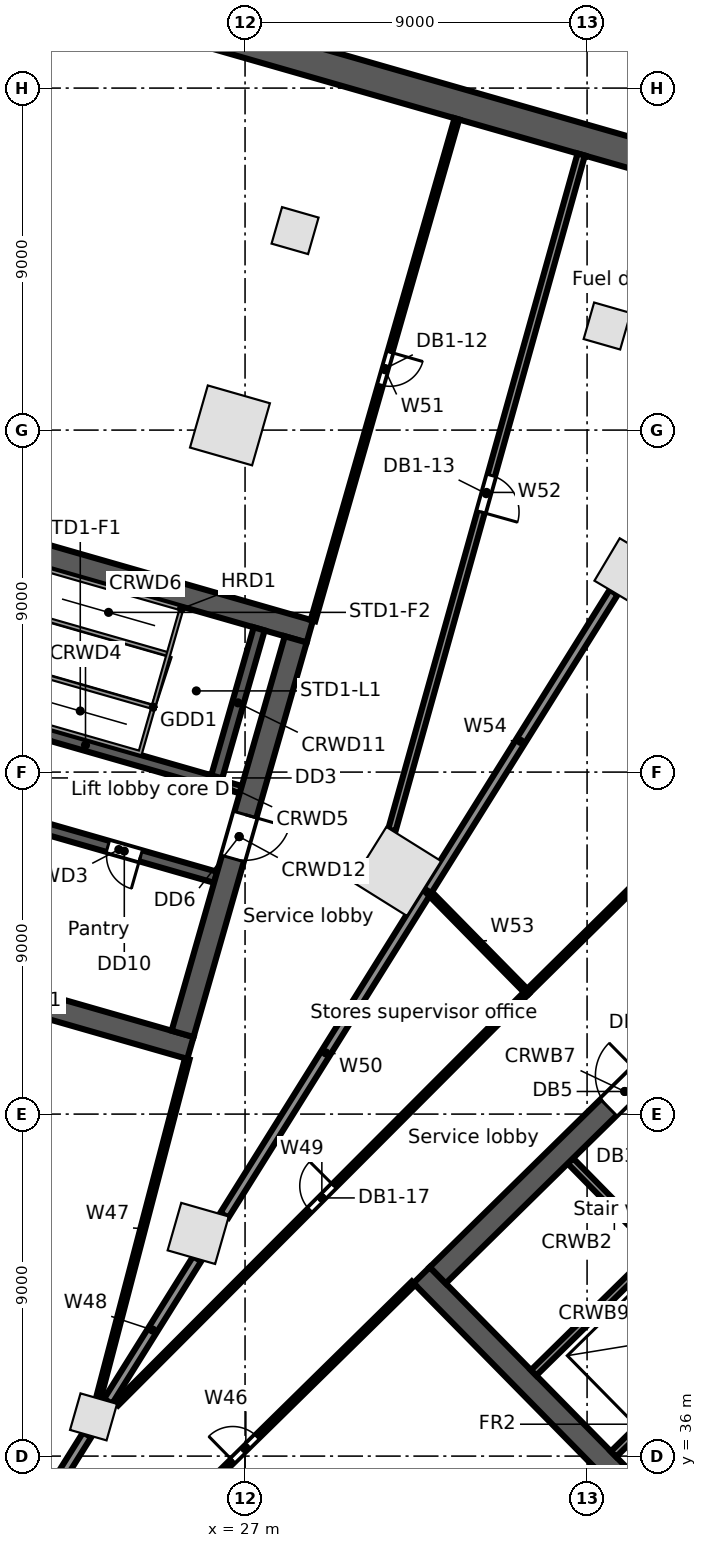
"""IFC4 building model, lengths in metres.
Left out: names, types, materials, properties, quantities, classifications, styles, units other than length and angle.
Written with IfcOpenShell. Run it as: python <this file> out.ifc"""

import sys

from ifc_helpers import new_model, si_unit, direction, frame, frame_2d, origin, origin_2d, place, context, subcontext, project, spatial, rectangle, extrude, element, fill, save


model = new_model("IFC4")
c1 = context("Model", 3, precision=1e-05, world=origin(), true_north=direction((0.0, 1.0)))
c2 = subcontext(c1, "Body", "Model", "MODEL_VIEW")
j1 = project(units=[si_unit("LENGTHUNIT", "METRE"), si_unit("PLANEANGLEUNIT", "RADIAN")], contexts=[c1])
p1 = place(None, origin())
s1 = spatial("IfcSite", under=j1, at=p1, CompositionType="ELEMENT")
p2 = place(p1, origin())
s2 = spatial("IfcBuilding", under=s1, at=p2, CompositionType="ELEMENT")
p3 = place(p2, frame((0.0, 0.0, -4.8)))
s3 = spatial("IfcBuildingStorey", under=s2, at=p3, CompositionType="ELEMENT", Elevation=-4.8)
p4 = place(p3, frame((38.062, 70.032, 0.0), z_axis=(0.0, 0.0, 1.0), x_axis=(-0.961260654426, 0.275640987977, 0.0)))
e1 = element("IfcWall", 1, at=p4, inside=s3, PredefinedType="SOLIDWALL", context=c2, shape_type="SweptSolid", body=[
    extrude(rectangle(XDim=35.435, YDim=0.8, at=frame_2d((17.718, 0.0))), origin(), (0.0, 0.0, 1.0), 4.8),
])
p5 = place(p3, frame((37.085, 59.262, 0.0), z_axis=(0.0, 0.0, 1.0), x_axis=(-0.859406411501, 0.511293086077, 0.0)))
e2 = element("IfcColumn", 2, at=p5, inside=s3, PredefinedType="COLUMN", context=c2, shape_type="SweptSolid", body=[
    extrude(rectangle(XDim=1.3, YDim=1.3, at=origin_2d()), origin(), (0.0, 0.0, 1.0), 4.8),
])
p6 = place(p3, frame((26.603, 63.124, 0.0), z_axis=(0.0, 0.0, 1.0), x_axis=(-0.961261695938, 0.275637355817, 0.0)))
e3 = element("IfcColumn", 3, at=p6, inside=s3, PredefinedType="COLUMN", context=c2, shape_type="SweptSolid", body=[
    extrude(rectangle(XDim=1.7, YDim=1.7, at=origin_2d()), origin(), (0.0, 0.0, 1.0), 4.8),
])
p7 = place(p3, frame((25.767, 41.86, 0.0), z_axis=(0.0, 0.0, 1.0), x_axis=(0.961261695938, -0.275637355817, 0.0)))
e4 = element("IfcColumn", 4, at=p7, inside=s3, PredefinedType="COLUMN", context=c2, shape_type="SweptSolid", body=[
    extrude(rectangle(XDim=1.3, YDim=1.3, at=origin_2d()), origin(), (0.0, 0.0, 1.0), 4.8),
])
p8 = place(p3, frame((30.99, 51.386, 0.0), z_axis=(0.0, 0.0, 1.0), x_axis=(0.529919264233, 0.848048096156, 0.0)))
e5 = element("IfcColumn", 5, at=p8, inside=s3, PredefinedType="COLUMN", context=c2, shape_type="SweptSolid", body=[
    extrude(rectangle(XDim=1.7, YDim=1.7, at=origin_2d()), origin(), (0.0, 0.0, 1.0), 4.8),
])
for number, where, z_axis, x_axis in (
    (6, (36.528, 65.739, 0.0), (0.0, 0.0, 1.0), (-0.961, 0.276, 0.0)),
    (7, (28.316, 68.25, 0.0), (0.0, 0.0, 1.0), (-0.961, 0.276, 0.0)),
    (8, (23.013, 37.032, 0.0), (0.0, 0.0, 1.0), (0.961, -0.276, 0.0)),
):
    element("IfcColumn", number, at=place(p3, frame(where, z_axis=z_axis, x_axis=x_axis)), inside=s3, PredefinedType="COLUMN", context=c2, shape_type="SweptSolid", body=[
        extrude(rectangle(XDim=1.0, YDim=1.0, at=origin_2d()), origin(), (0.0, 0.0, 1.0), 4.8),
    ])
p9 = place(p3, frame((31.646, 40.763, 0.0), z_axis=(0.0, 0.0, 1.0), x_axis=(0.700911255944, -0.713248491965, 0.0)))
e9 = element("IfcWall", 9, at=p9, inside=s3, PredefinedType="SOLIDWALL", context=c2, shape_type="SweptSolid", body=[
    extrude(rectangle(XDim=15.0, YDim=0.6, at=frame_2d((7.5, 0.0))), origin(), (0.0, 0.0, 1.0), 4.35),
])
p10 = place(p9, frame((12.9, 0.0, 0.0)))
e10 = element("IfcOpeningElement", 10, at=p10, cuts=e9, PredefinedType="OPENING", context=c2, shape_type="SweptSolid", body=[
    extrude(rectangle(XDim=1.2, YDim=2.1, at=frame_2d((0.6, 1.05))), frame((0.0, 0.31, 0.0), z_axis=(0.0, -1.0, 0.0), x_axis=(1.0, 0.0, 0.0)), (0.0, 0.0, 1.0), 0.62),
])
p11 = place(p3, frame((35.561, 43.769, 0.0), z_axis=(0.0, 0.0, 1.0), x_axis=(0.70090232736, -0.713257266, 0.0)))
e11 = element("IfcWall", 11, at=p11, inside=s3, PredefinedType="SOLIDWALL", context=c2, shape_type="SweptSolid", body=[
    extrude(rectangle(XDim=3.3, YDim=0.2, at=frame_2d((1.65, 0.0))), origin(), (0.0, 0.0, 1.0), 4.35),
])
p12 = place(p3, frame((32.07, 40.759, 0.0), z_axis=(0.0, 0.0, 1.0), x_axis=(0.713245344712, 0.70091445858, 0.0)))
e12 = element("IfcWall", 12, at=p12, inside=s3, PredefinedType="SOLIDWALL", context=c2, shape_type="SweptSolid", body=[
    extrude(rectangle(XDim=13.8, YDim=0.6, at=frame_2d((6.9, 0.0))), origin(), (0.0, 0.0, 1.0), 4.35),
])
p13 = place(p12, frame((6.3, 0.0, 0.0)))
e13 = element("IfcOpeningElement", 13, at=p13, cuts=e12, PredefinedType="OPENING", context=c2, shape_type="SweptSolid", body=[
    extrude(rectangle(XDim=1.2, YDim=2.1, at=frame_2d((0.6, 1.05))), frame((0.0, 0.31, 0.0), z_axis=(0.0, -1.0, 0.0), x_axis=(1.0, 0.0, 0.0)), (0.0, 0.0, 1.0), 0.62),
])
p14 = place(p3, frame((37.104, 42.342, 0.0), z_axis=(0.0, 0.0, 1.0), x_axis=(0.713281298468, 0.700877870428, 0.0)))
e14 = element("IfcWall", 14, at=p14, inside=s3, PredefinedType="PARTITIONING", context=c2, shape_type="SweptSolid", body=[
    extrude(rectangle(XDim=4.35, YDim=0.2, at=frame_2d((2.175, 0.0))), origin(), (0.0, 0.0, 1.0), 4.35),
])
p15 = place(p14, frame((1.7, 0.0, 0.0)))
e15 = element("IfcOpeningElement", 15, at=p15, cuts=e14, PredefinedType="OPENING", context=c2, shape_type="SweptSolid", body=[
    extrude(rectangle(XDim=1.0, YDim=2.1, at=frame_2d((0.5, 1.05))), frame((0.0, 0.11, 0.0), z_axis=(0.0, -1.0, 0.0), x_axis=(1.0, 0.0, 0.0)), (0.0, 0.0, 1.0), 0.22),
])
p16 = place(p3, frame((34.593, 38.191, 0.0), z_axis=(0.0, 0.0, 1.0), x_axis=(0.713252216116, 0.700907466222, 0.0)))
e16 = element("IfcWall", 16, at=p16, inside=s3, PredefinedType="SOLIDWALL", context=c2, shape_type="SweptSolid", body=[
    extrude(rectangle(XDim=4.45, YDim=0.2, at=frame_2d((2.225, 0.0))), origin(), (0.0, 0.0, 1.0), 4.35),
])
p17 = place(p3, frame((36.696, 36.052, 0.0), z_axis=(0.0, 0.0, 1.0), x_axis=(0.713251741427, 0.700907949271, 0.0)))
e17 = element("IfcWall", 17, at=p17, inside=s3, PredefinedType="SOLIDWALL", context=c2, shape_type="SweptSolid", body=[
    extrude(rectangle(XDim=4.45, YDim=0.2, at=frame_2d((2.225, 0.0))), origin(), (0.0, 0.0, 1.0), 4.35),
])
p18 = place(p3, frame((16.911, 49.221, 0.0), z_axis=(0.0, 0.0, 1.0), x_axis=(0.96126248289, -0.275634611374, 0.0)))
e18 = element("IfcWall", 18, at=p18, inside=s3, PredefinedType="SOLIDWALL", context=c2, shape_type="SweptSolid", body=[
    extrude(rectangle(XDim=9.0, YDim=0.6, at=frame_2d((4.5, 0.0))), origin(), (0.0, 0.0, 1.0), 4.35),
])
p19 = place(p3, frame((21.131, 52.692, 0.0), z_axis=(0.0, 0.0, 1.0), x_axis=(0.961271492568, -0.275603188616, 0.0)))
e19 = element("IfcWall", 19, at=p19, inside=s3, PredefinedType="SOLIDWALL", context=c2, shape_type="SweptSolid", body=[
    extrude(rectangle(XDim=5.3, YDim=0.3, at=frame_2d((2.65, 0.0))), origin(), (0.0, 0.0, 1.0), 4.35),
])
p20 = place(p19, frame((2.35, 0.0, 0.0)))
e20 = element("IfcOpeningElement", 20, at=p20, cuts=e19, PredefinedType="OPENING", context=c2, shape_type="SweptSolid", body=[
    extrude(rectangle(XDim=0.9, YDim=2.1, at=frame_2d((0.45, 1.05))), frame((0.0, 0.16, 0.0), z_axis=(0.0, -1.0, 0.0), x_axis=(1.0, 0.0, 0.0)), (0.0, 0.0, 1.0), 0.32),
])
p21 = place(p3, frame((19.389, 55.689, 0.0), z_axis=(0.0, 0.0, 1.0), x_axis=(0.961261397636, -0.275638396117, 0.0)))
e21 = element("IfcWall", 21, at=p21, inside=s3, PredefinedType="SOLIDWALL", context=c2, shape_type="SweptSolid", body=[
    extrude(rectangle(XDim=7.1, YDim=0.3, at=frame_2d((3.55, 0.0))), origin(), (0.0, 0.0, 1.0), 4.35),
])
p22 = place(p21, frame((0.2, 0.0, 0.0)))
e22 = element("IfcOpeningElement", 22, at=p22, cuts=e21, PredefinedType="OPENING", context=c2, shape_type="SweptSolid", body=[
    extrude(rectangle(XDim=1.0, YDim=2.1, at=frame_2d((0.5, 1.05))), frame((0.0, 0.16, 0.0), z_axis=(0.0, -1.0, 0.0), x_axis=(1.0, 0.0, 0.0)), (0.0, 0.0, 1.0), 0.32),
])
p23 = place(p3, frame((26.214, 53.732, 0.0), z_axis=(0.0, 0.0, 1.0), x_axis=(0.96122076476, -0.27578005982, 0.0)))
e23 = element("IfcWall", 23, at=p23, inside=s3, PredefinedType="SOLIDWALL", context=c2, shape_type="SweptSolid", body=[
    extrude(rectangle(XDim=0.7, YDim=0.2, at=frame_2d((0.35, 0.0))), origin(), (0.0, 0.0, 1.0), 4.35),
])
p24 = place(p3, frame((20.053, 60.18, 0.0), z_axis=(0.0, 0.0, 1.0), x_axis=(0.96126248289, -0.275634611374, 0.0)))
e24 = element("IfcWall", 24, at=p24, inside=s3, PredefinedType="SOLIDWALL", context=c2, shape_type="SweptSolid", body=[
    extrude(rectangle(XDim=9.0, YDim=0.6, at=frame_2d((4.5, 0.0))), origin(), (0.0, 0.0, 1.0), 4.35),
])
p25 = place(p3, frame((26.256, 53.876, 0.0), z_axis=(0.0, 0.0, 1.0), x_axis=(0.275612739511, 0.961268754209, 0.0)))
e25 = element("IfcWall", 25, at=p25, inside=s3, PredefinedType="SOLIDWALL", context=c2, shape_type="SweptSolid", body=[
    extrude(rectangle(XDim=4.05, YDim=0.3, at=frame_2d((2.025, 0.0))), origin(), (0.0, 0.0, 1.0), 4.35),
])
p26 = place(p3, frame((25.356, 47.112, 0.0), z_axis=(0.0, 0.0, 1.0), x_axis=(0.275631631629, 0.961263337304, 0.0)))
e26 = element("IfcWall", 26, at=p26, inside=s3, PredefinedType="SOLIDWALL", context=c2, shape_type="SweptSolid", body=[
    extrude(rectangle(XDim=10.8, YDim=0.6, at=frame_2d((5.4, 0.0))), origin(), (0.0, 0.0, 1.0), 4.35),
])
p27 = place(p26, frame((4.8, 0.0, 0.0)))
e27 = element("IfcOpeningElement", 27, at=p27, cuts=e26, PredefinedType="OPENING", context=c2, shape_type="SweptSolid", body=[
    extrude(rectangle(XDim=1.2, YDim=2.1, at=frame_2d((0.6, 1.05))), frame((0.0, 0.31, 0.0), z_axis=(0.0, -1.0, 0.0), x_axis=(1.0, 0.0, 0.0)), (0.0, 0.0, 1.0), 0.62),
])
p28 = place(p3, frame((20.916, 33.472, 0.0), z_axis=(0.0, 0.0, 1.0), x_axis=(0.529775918086, 0.848137651927, 0.0)))
e28 = element("IfcWall", 28, at=p28, inside=s3, PredefinedType="PARTITIONING", context=c2, shape_type="SweptSolid", body=[
    extrude(rectangle(XDim=3.641, YDim=0.25, at=frame_2d((1.821, 0.0))), origin(), (0.0, 0.0, 1.0), 4.35),
])
p29 = place(p3, frame((22.61, 31.884, 0.0), z_axis=(0.0, 0.0, 1.0), x_axis=(0.71329764845, 0.700861230712, 0.0)))
e29 = element("IfcWall", 29, at=p29, inside=s3, PredefinedType="PARTITIONING", context=c2, shape_type="SweptSolid", body=[
    extrude(rectangle(XDim=12.368, YDim=0.125, at=frame_2d((6.184, 0.0))), origin(), (0.0, 0.0, 1.0), 3.63),
])
p30 = place(p29, frame((5.7, 0.0, 0.0)))
e30 = element("IfcOpeningElement", 30, at=p30, cuts=e29, PredefinedType="OPENING", context=c2, shape_type="SweptSolid", body=[
    extrude(rectangle(XDim=0.9, YDim=2.1, at=frame_2d((0.45, 1.05))), frame((0.0, 0.073, 0.0), z_axis=(0.0, -1.0, 0.0), x_axis=(1.0, 0.0, 0.0)), (0.0, 0.0, 1.0), 0.145),
])
p31 = place(p3, frame((23.139, 37.516, 0.0), z_axis=(0.0, 0.0, 1.0), x_axis=(0.253335246865, 0.967378546741, 0.0)))
e31 = element("IfcWall", 31, at=p31, inside=s3, PredefinedType="PARTITIONING", context=c2, shape_type="SweptSolid", body=[
    extrude(rectangle(XDim=9.237, YDim=0.125, at=frame_2d((4.619, 0.0))), origin(), (0.0, 0.0, 1.0), 3.63),
])
p32 = place(p3, frame((23.396, 37.442, 0.0), z_axis=(0.0, 0.0, 1.0), x_axis=(0.529879823435, 0.848072740227, 0.0)))
e32 = element("IfcWall", 32, at=p32, inside=s3, PredefinedType="PARTITIONING", context=c2, shape_type="SweptSolid", body=[
    extrude(rectangle(XDim=4.422, YDim=0.25, at=frame_2d((2.211, 0.0))), origin(), (0.0, 0.0, 1.0), 3.412),
])
p33 = place(p3, frame((23.618, 37.379, 0.0), z_axis=(0.0, 0.0, 1.0), x_axis=(0.706356332605, 0.707856434165, 0.0)))
e33 = element("IfcWall", 33, at=p33, inside=s3, PredefinedType="PARTITIONING", context=c2, shape_type="SweptSolid", body=[
    extrude(rectangle(XDim=15.298, YDim=0.125, at=frame_2d((7.649, 0.0))), origin(), (0.0, 0.0, 1.0), 3.418),
])
p34 = place(p33, frame((7.2, 0.0, 0.0)))
e34 = element("IfcOpeningElement", 34, at=p34, cuts=e33, PredefinedType="OPENING", context=c2, shape_type="SweptSolid", body=[
    extrude(rectangle(XDim=0.9, YDim=2.1, at=frame_2d((0.45, 1.05))), frame((0.0, 0.073, 0.0), z_axis=(0.0, -1.0, 0.0), x_axis=(1.0, 0.0, 0.0)), (0.0, 0.0, 1.0), 0.145),
])
p35 = place(p3, frame((26.456, 42.338, 0.0), z_axis=(0.0, 0.0, 1.0), x_axis=(0.529866075757, 0.848081329686, 0.0)))
e35 = element("IfcWall", 35, at=p35, inside=s3, PredefinedType="PARTITIONING", context=c2, shape_type="SweptSolid", body=[
    extrude(rectangle(XDim=10.076, YDim=0.25, at=frame_2d((5.038, 0.0))), origin(), (0.0, 0.0, 1.0), 3.412),
])
p36 = place(p3, frame((28.787, 57.987, 0.0), z_axis=(0.0, 0.0, 1.0), x_axis=(0.27563893724, 0.961261242471, 0.0)))
e36 = element("IfcWall", 36, at=p36, inside=s3, PredefinedType="PARTITIONING", context=c2, shape_type="SweptSolid", body=[
    extrude(rectangle(XDim=13.735, YDim=0.125, at=frame_2d((6.867, 0.0))), origin(), (0.0, 0.0, 1.0), 3.53),
])
p37 = place(p36, frame((6.45, 0.0, 0.0)))
e37 = element("IfcOpeningElement", 37, at=p37, cuts=e36, PredefinedType="OPENING", context=c2, shape_type="SweptSolid", body=[
    extrude(rectangle(XDim=0.9, YDim=2.1, at=frame_2d((0.45, 1.05))), frame((0.0, 0.073, 0.0), z_axis=(0.0, -1.0, 0.0), x_axis=(1.0, 0.0, 0.0)), (0.0, 0.0, 1.0), 0.145),
])
p38 = place(p3, frame((30.862, 52.468, 0.0), z_axis=(0.0, 0.0, 1.0), x_axis=(0.269850069582, 0.962902352238, 0.0)))
e38 = element("IfcWall", 38, at=p38, inside=s3, PredefinedType="PARTITIONING", context=c2, shape_type="SweptSolid", body=[
    extrude(rectangle(XDim=18.469, YDim=0.2, at=frame_2d((9.234, 0.0))), origin(), (0.0, 0.0, 1.0), 3.53),
])
p39 = place(p38, frame((8.7, 0.0, 0.0)))
e39 = element("IfcOpeningElement", 39, at=p39, cuts=e38, PredefinedType="OPENING", context=c2, shape_type="SweptSolid", body=[
    extrude(rectangle(XDim=1.0, YDim=2.1, at=frame_2d((0.5, 1.05))), frame((0.0, 0.11, 0.0), z_axis=(0.0, -1.0, 0.0), x_axis=(1.0, 0.0, 0.0)), (0.0, 0.0, 1.0), 0.22),
])
p40 = place(p3, frame((31.795, 50.883, 0.0), z_axis=(0.0, 0.0, 1.0), x_axis=(0.700961783082, -0.713198835289, 0.0)))
e40 = element("IfcWall", 40, at=p40, inside=s3, PredefinedType="PARTITIONING", context=c2, shape_type="SweptSolid", body=[
    extrude(rectangle(XDim=3.751, YDim=0.125, at=frame_2d((1.875, 0.0))), origin(), (0.0, 0.0, 1.0), 3.418),
])
p41 = place(p3, frame((31.795, 50.883, 0.0), z_axis=(0.0, 0.0, 1.0), x_axis=(0.529939676421, 0.848035340864, 0.0)))
e41 = element("IfcWall", 41, at=p41, inside=s3, PredefinedType="PARTITIONING", context=c2, shape_type="SweptSolid", body=[
    extrude(rectangle(XDim=9.258, YDim=0.25, at=frame_2d((4.629, 0.0))), origin(), (0.0, 0.0, 1.0), 3.418),
])
p42 = place(p3, frame((33.916, 20.378, 0.0), z_axis=(0.0, 0.0, 1.0), x_axis=(0.857167223985, 0.515038202589, 0.0)))
e42 = element("IfcWall", 42, at=p42, inside=s3, PredefinedType="PARTITIONING", context=c2, shape_type="SweptSolid", body=[
    extrude(rectangle(XDim=39.374, YDim=0.125, at=frame_2d((19.687, 0.0))), origin(), (0.0, 0.0, 1.0), 3.418),
])
p43 = place(p3, frame((34.424, 48.208, 0.0), z_axis=(0.0, 0.0, 1.0), x_axis=(0.711998848244, 0.702180632102, 0.0)))
e43 = element("IfcWall", 43, at=p43, inside=s3, PredefinedType="PARTITIONING", context=c2, shape_type="SweptSolid", body=[
    extrude(rectangle(XDim=19.868, YDim=0.125, at=frame_2d((9.934, 0.0))), origin(), (0.0, 0.0, 1.0), 3.522),
])
p44 = place(p43, frame((9.45, 0.0, 0.0)))
e44 = element("IfcOpeningElement", 44, at=p44, cuts=e43, PredefinedType="OPENING", context=c2, shape_type="SweptSolid", body=[
    extrude(rectangle(XDim=0.9, YDim=2.1, at=frame_2d((0.45, 1.05))), frame((0.0, 0.073, 0.0), z_axis=(0.0, -1.0, 0.0), x_axis=(1.0, 0.0, 0.0)), (0.0, 0.0, 1.0), 0.145),
])
p45 = place(p13, origin())
e45 = element("IfcDoor", 45, at=p45, inside=s3, OperationType="SINGLE_SWING_RIGHT", PredefinedType="DOOR", context=c2, shape_type="SweptSolid", body=[
    extrude(rectangle(XDim=1.2, YDim=2.1, at=frame_2d((0.6, 1.05))), frame((0.0, 0.025, 0.0), z_axis=(0.0, -1.0, 0.0), x_axis=(1.0, 0.0, 0.0)), (0.0, 0.0, 1.0), 0.05),
])
fill(e13, e45)
p46 = place(p27, frame((1.2, 0.0, 0.0), z_axis=(0.0, 0.0, 1.0), x_axis=(-1.0, 0.0, 0.0)))
e46 = element("IfcDoor", 46, at=p46, inside=s3, OperationType="SINGLE_SWING_LEFT", PredefinedType="DOOR", context=c2, shape_type="SweptSolid", body=[
    extrude(rectangle(XDim=1.2, YDim=2.1, at=frame_2d((0.6, 1.05))), frame((0.0, 0.025, 0.0), z_axis=(0.0, -1.0, 0.0), x_axis=(1.0, 0.0, 0.0)), (0.0, 0.0, 1.0), 0.05),
])
fill(e27, e46)
p47 = place(p20, frame((0.9, 0.0, 0.0), z_axis=(0.0, 0.0, 1.0), x_axis=(-1.0, 0.0, 0.0)))
e47 = element("IfcDoor", 47, at=p47, inside=s3, OperationType="SINGLE_SWING_LEFT", PredefinedType="DOOR", context=c2, shape_type="SweptSolid", body=[
    extrude(rectangle(XDim=0.9, YDim=2.1, at=frame_2d((0.45, 1.05))), frame((0.0, 0.025, 0.0), z_axis=(0.0, -1.0, 0.0), x_axis=(1.0, 0.0, 0.0)), (0.0, 0.0, 1.0), 0.05),
])
fill(e20, e47)
p48 = place(p37, frame((0.9, 0.0, 0.0), z_axis=(0.0, 0.0, 1.0), x_axis=(-1.0, 0.0, 0.0)))
e48 = element("IfcDoor", 48, at=p48, inside=s3, OperationType="SINGLE_SWING_LEFT", PredefinedType="DOOR", context=c2, shape_type="SweptSolid", body=[
    extrude(rectangle(XDim=0.9, YDim=2.1, at=frame_2d((0.45, 1.05))), frame((0.0, 0.025, 0.0), z_axis=(0.0, -1.0, 0.0), x_axis=(1.0, 0.0, 0.0)), (0.0, 0.0, 1.0), 0.05),
])
fill(e37, e48)
p49 = place(p39, frame((1.0, 0.0, 0.0), z_axis=(0.0, 0.0, 1.0), x_axis=(-1.0, 0.0, 0.0)))
e49 = element("IfcDoor", 49, at=p49, inside=s3, OperationType="SINGLE_SWING_RIGHT", PredefinedType="DOOR", context=c2, shape_type="SweptSolid", body=[
    extrude(rectangle(XDim=1.0, YDim=2.1, at=frame_2d((0.5, 1.05))), frame((0.0, 0.025, 0.0), z_axis=(0.0, -1.0, 0.0), x_axis=(1.0, 0.0, 0.0)), (0.0, 0.0, 1.0), 0.05),
])
fill(e39, e49)
p50 = place(p30, origin())
e50 = element("IfcDoor", 50, at=p50, inside=s3, OperationType="SINGLE_SWING_LEFT", PredefinedType="DOOR", context=c2, shape_type="SweptSolid", body=[
    extrude(rectangle(XDim=0.9, YDim=2.1, at=frame_2d((0.45, 1.05))), frame((0.0, 0.025, 0.0), z_axis=(0.0, -1.0, 0.0), x_axis=(1.0, 0.0, 0.0)), (0.0, 0.0, 1.0), 0.05),
])
fill(e30, e50)
p51 = place(p34, origin())
e51 = element("IfcDoor", 51, at=p51, inside=s3, OperationType="SINGLE_SWING_RIGHT", PredefinedType="DOOR", context=c2, shape_type="SweptSolid", body=[
    extrude(rectangle(XDim=0.9, YDim=2.1, at=frame_2d((0.45, 1.05))), frame((0.0, 0.025, 0.0), z_axis=(0.0, -1.0, 0.0), x_axis=(1.0, 0.0, 0.0)), (0.0, 0.0, 1.0), 0.05),
])
fill(e34, e51)
save(model, sys.argv[1])
